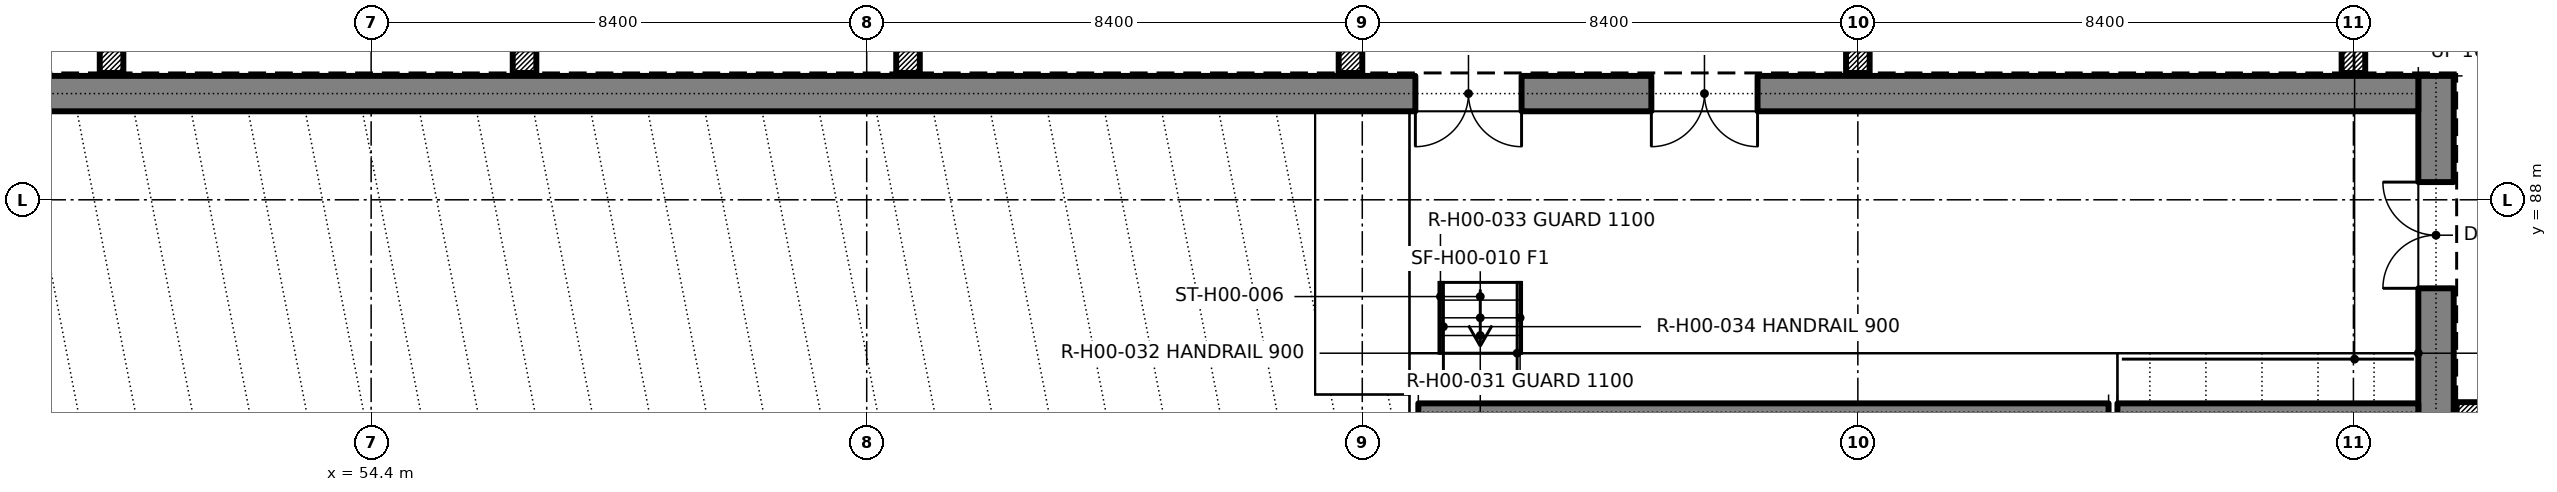
"""IFC4 building model, lengths in metres.
Left out: names, types, materials, properties, quantities, classifications, styles, units other than length and angle.
Written with IfcOpenShell. Run it as: python <this file> out.ifc"""

import sys

from ifc_helpers import new_model, si_unit, direction, frame, frame_2d, origin, origin_2d, place, context, subcontext, project, spatial, polyline, rectangle, outline, extrude, element, fill, save


model = new_model("IFC4")
c1 = context("Model", 3, precision=1e-05, world=origin(), true_north=direction((0.0, 1.0)))
c2 = subcontext(c1, "Body", "Model", "MODEL_VIEW")
j1 = project(units=[si_unit("LENGTHUNIT", "METRE"), si_unit("PLANEANGLEUNIT", "RADIAN")], contexts=[c1])
p1 = place(None, origin())
s1 = spatial("IfcSite", under=j1, at=p1, CompositionType="ELEMENT")
p2 = place(p1, origin())
s2 = spatial("IfcBuilding", under=s1, at=p2, CompositionType="ELEMENT")
p3 = place(p2, origin())
s3 = spatial("IfcBuildingStorey", under=s2, at=p3, CompositionType="ELEMENT", Elevation=0.0)
p4 = place(p3, frame((89.4, 60.7, 0.0), z_axis=(0.0, 0.0, 1.0), x_axis=(0.0, 1.0, 0.0)))
e1 = element("IfcWall", 1, at=p4, inside=s3, PredefinedType="SOLIDWALL", context=c2, shape_type="SweptSolid", body=[
    extrude(rectangle(XDim=29.4, YDim=0.6, at=frame_2d((14.7, 0.0))), origin(), (0.0, 0.0, 1.0), 5.4),
])
p5 = place(p4, frame((1.8, 0.0, 0.0)))
e2 = element("IfcOpeningElement", 2, at=p5, cuts=e1, PredefinedType="OPENING", context=c2, shape_type="SweptSolid", body=[
    extrude(rectangle(XDim=1.8, YDim=2.1, at=frame_2d((0.9, 1.05))), frame((0.0, 0.31, 0.0), z_axis=(0.0, -1.0, 0.0), x_axis=(1.0, 0.0, 0.0)), (0.0, 0.0, 1.0), 0.62),
])
p6 = place(p4, frame((25.8, 0.0, 0.0)))
e3 = element("IfcOpeningElement", 3, at=p6, cuts=e1, PredefinedType="OPENING", context=c2, shape_type="SweptSolid", body=[
    extrude(rectangle(XDim=1.8, YDim=2.1, at=frame_2d((0.9, 1.05))), frame((0.0, 0.31, 0.0), z_axis=(0.0, -1.0, 0.0), x_axis=(1.0, 0.0, 0.0)), (0.0, 0.0, 1.0), 0.62),
])
p7 = place(p3, frame((36.5, 89.8, 0.0), z_axis=(0.0, 0.0, 1.0), x_axis=(1.0, 0.0, 0.0)))
e4 = element("IfcWall", 4, at=p7, inside=s3, PredefinedType="SOLIDWALL", context=c2, shape_type="SweptSolid", body=[
    extrude(rectangle(XDim=52.6, YDim=0.6, at=frame_2d((26.3, 0.0))), origin(), (0.0, 0.0, 1.0), 5.4),
])
p8 = place(p7, frame((35.6, 0.0, 0.0)))
e5 = element("IfcOpeningElement", 5, at=p8, cuts=e4, PredefinedType="OPENING", context=c2, shape_type="SweptSolid", body=[
    extrude(rectangle(XDim=1.8, YDim=2.1, at=frame_2d((0.9, 1.05))), frame((0.0, 0.31, 0.0), z_axis=(0.0, -1.0, 0.0), x_axis=(1.0, 0.0, 0.0)), (0.0, 0.0, 1.0), 0.62),
])
p9 = place(p7, frame((39.6, 0.0, 0.0)))
e6 = element("IfcOpeningElement", 6, at=p9, cuts=e4, PredefinedType="OPENING", context=c2, shape_type="SweptSolid", body=[
    extrude(rectangle(XDim=1.8, YDim=2.1, at=frame_2d((0.9, 1.05))), frame((0.0, 0.31, 0.0), z_axis=(0.0, -1.0, 0.0), x_axis=(1.0, 0.0, 0.0)), (0.0, 0.0, 1.0), 0.62),
])
for number, where, z_axis, x_axis in (
    (7, (50.0, 90.35, 0.0), (0.0, 0.0, 1.0), (1.0, 0.0, 0.0)),
    (8, (57.0, 90.35, 0.0), (0.0, 0.0, 1.0), (1.0, 0.0, 0.0)),
    (9, (63.5, 90.35, 0.0), (0.0, 0.0, 1.0), (1.0, 0.0, 0.0)),
    (10, (71.0, 90.35, 0.0), (0.0, 0.0, 1.0), (1.0, 0.0, 0.0)),
    (11, (79.6, 90.35, 0.0), (0.0, 0.0, 1.0), (1.0, 0.0, 0.0)),
    (12, (88.0, 90.35, 0.0), (0.0, 0.0, 1.0), (1.0, 0.0, 0.0)),
    (13, (89.95, 84.37, 0.0), (0.0, 0.0, 1.0), (1.0, 0.0, 0.0)),
):
    element("IfcColumn", number, at=place(p3, frame(where, z_axis=z_axis, x_axis=x_axis)), inside=s3, PredefinedType="COLUMN", context=c2, shape_type="SweptSolid", body=[
        extrude(rectangle(XDim=0.4, YDim=0.4, at=origin_2d()), origin(), (0.0, 0.0, 1.0), 5.4),
    ])
p10 = place(p3, frame((72.15, 84.4, 0.0), z_axis=(0.0, 0.0, 1.0), x_axis=(1.0, 0.0, 0.0)))
e14 = element("IfcWall", 14, at=p10, inside=s3, PredefinedType="SOLIDWALL", context=c2, shape_type="SweptSolid", body=[
    extrude(rectangle(XDim=11.7, YDim=0.3, at=frame_2d((5.85, 0.0))), origin(), (0.0, 0.0, 1.0), 0.45),
])
p11 = place(p3, frame((84.0, 84.4, 0.0), z_axis=(0.0, 0.0, 1.0), x_axis=(1.0, 0.0, 0.0)))
e15 = element("IfcWall", 15, at=p11, inside=s3, PredefinedType="SOLIDWALL", context=c2, shape_type="SweptSolid", body=[
    extrude(outline(polyline([(0.0, 0.0), (5.1, 0.0), (5.1, 1.95), (0.0, 0.75), (0.0, 0.0)])), frame((0.0, 0.15, 0.0), z_axis=(0.0, -1.0, 0.0), x_axis=(1.0, 0.0, 0.0)), (0.0, 0.0, 1.0), 0.3),
])
p12 = place(p3, frame((89.4, 88.83, -0.3), z_axis=(0.0, 0.0, 1.0), x_axis=(0.0, 1.0, 0.0)))
e16 = element("IfcWall", 16, at=p12, inside=s3, PredefinedType="SOLIDWALL", context=c2, shape_type="SweptSolid", body=[
    extrude(rectangle(XDim=1.27, YDim=0.6, at=frame_2d((0.635, 0.0))), origin(), (0.0, 0.0, 1.0), 0.3),
])
p13 = place(p3, frame((89.4, 82.95, -0.3), z_axis=(0.0, 0.0, 1.0), x_axis=(0.0, 1.0, 0.0)))
e17 = element("IfcWall", 17, at=p13, inside=s3, PredefinedType="SOLIDWALL", context=c2, shape_type="SweptSolid", body=[
    extrude(rectangle(XDim=2.84, YDim=0.6, at=frame_2d((1.42, 0.0))), origin(), (0.0, 0.0, 1.0), 0.3),
])
for number, where, z_axis, x_axis in (
    (18, (89.4, 85.79, -0.3), (0.0, 0.0, 1.0), (0.0, 1.0, 0.0)),
    (19, (48.48, 89.8, -0.3), (0.0, 0.0, 1.0), (1.0, 0.0, 0.0)),
    (20, (55.48, 89.8, -0.3), (0.0, 0.0, 1.0), (1.0, 0.0, 0.0)),
    (21, (61.98, 89.8, -0.3), (0.0, 0.0, 1.0), (1.0, 0.0, 0.0)),
    (22, (69.48, 89.8, -0.3), (0.0, 0.0, 1.0), (1.0, 0.0, 0.0)),
    (23, (78.08, 89.8, -0.3), (0.0, 0.0, 1.0), (1.0, 0.0, 0.0)),
):
    element("IfcWall", number, at=place(p3, frame(where, z_axis=z_axis, x_axis=x_axis)), inside=s3, PredefinedType="SOLIDWALL", context=c2, shape_type="SweptSolid", body=[
        extrude(rectangle(XDim=3.04, YDim=0.6, at=frame_2d((1.52, 0.0))), origin(), (0.0, 0.0, 1.0), 0.3),
    ])
p14 = place(p3, frame((86.48, 89.8, -0.3), z_axis=(0.0, 0.0, 1.0), x_axis=(1.0, 0.0, 0.0)))
e24 = element("IfcWall", 24, at=p14, inside=s3, PredefinedType="SOLIDWALL", context=c2, shape_type="SweptSolid", body=[
    extrude(rectangle(XDim=2.62, YDim=0.6, at=frame_2d((1.31, 0.0))), origin(), (0.0, 0.0, 1.0), 0.3),
])
p15 = place(p3, frame((51.52, 89.8, -0.3), z_axis=(0.0, 0.0, 1.0), x_axis=(1.0, 0.0, 0.0)))
e25 = element("IfcWall", 25, at=p15, inside=s3, PredefinedType="SOLIDWALL", context=c2, shape_type="SweptSolid", body=[
    extrude(rectangle(XDim=3.96, YDim=0.6, at=frame_2d((1.98, 0.0))), origin(), (0.0, 0.0, 1.0), 0.3),
])
p16 = place(p3, frame((58.52, 89.8, -0.3), z_axis=(0.0, 0.0, 1.0), x_axis=(1.0, 0.0, 0.0)))
e26 = element("IfcWall", 26, at=p16, inside=s3, PredefinedType="SOLIDWALL", context=c2, shape_type="SweptSolid", body=[
    extrude(rectangle(XDim=3.46, YDim=0.6, at=frame_2d((1.73, 0.0))), origin(), (0.0, 0.0, 1.0), 0.3),
])
p17 = place(p3, frame((65.02, 89.8, -0.3), z_axis=(0.0, 0.0, 1.0), x_axis=(1.0, 0.0, 0.0)))
e27 = element("IfcWall", 27, at=p17, inside=s3, PredefinedType="SOLIDWALL", context=c2, shape_type="SweptSolid", body=[
    extrude(rectangle(XDim=4.46, YDim=0.6, at=frame_2d((2.23, 0.0))), origin(), (0.0, 0.0, 1.0), 0.3),
])
p18 = place(p3, frame((72.52, 89.8, -0.3), z_axis=(0.0, 0.0, 1.0), x_axis=(1.0, 0.0, 0.0)))
e28 = element("IfcWall", 28, at=p18, inside=s3, PredefinedType="SOLIDWALL", context=c2, shape_type="SweptSolid", body=[
    extrude(rectangle(XDim=5.56, YDim=0.6, at=frame_2d((2.78, 0.0))), origin(), (0.0, 0.0, 1.0), 0.3),
])
p19 = place(p3, frame((81.12, 89.8, -0.3), z_axis=(0.0, 0.0, 1.0), x_axis=(1.0, 0.0, 0.0)))
e29 = element("IfcWall", 29, at=p19, inside=s3, PredefinedType="SOLIDWALL", context=c2, shape_type="SweptSolid", body=[
    extrude(rectangle(XDim=5.36, YDim=0.6, at=frame_2d((2.68, 0.0))), origin(), (0.0, 0.0, 1.0), 0.3),
])
p20 = place(p3, frame((72.15, 84.4, -0.805), z_axis=(0.0, 0.0, 1.0), x_axis=(1.0, 0.0, 0.0)))
e30 = element("IfcWall", 30, at=p20, inside=s3, PredefinedType="SOLIDWALL", context=c2, shape_type="SweptSolid", body=[
    extrude(rectangle(XDim=0.47, YDim=0.3, at=frame_2d((0.235, 0.0))), origin(), (0.0, 0.0, 1.0), 0.805),
])
p21 = place(p3, frame((72.62, 84.4, -0.3), z_axis=(0.0, 0.0, 1.0), x_axis=(1.0, 0.0, 0.0)))
e31 = element("IfcWall", 31, at=p21, inside=s3, PredefinedType="SOLIDWALL", context=c2, shape_type="SweptSolid", body=[
    extrude(rectangle(XDim=11.4, YDim=0.3, at=frame_2d((5.7, 0.0))), origin(), (0.0, 0.0, 1.0), 0.3),
])
p22 = place(p3, frame((88.43, 84.4, -0.3), z_axis=(0.0, 0.0, 1.0), x_axis=(1.0, 0.0, 0.0)))
e32 = element("IfcWall", 32, at=p22, inside=s3, PredefinedType="SOLIDWALL", context=c2, shape_type="SweptSolid", body=[
    extrude(rectangle(XDim=0.67, YDim=0.3, at=frame_2d((0.335, 0.0))), origin(), (0.0, 0.0, 1.0), 0.3),
])
p23 = place(p3, frame((84.02, 84.4, -0.3), z_axis=(0.0, 0.0, 1.0), x_axis=(1.0, 0.0, 0.0)))
e33 = element("IfcWall", 33, at=p23, inside=s3, PredefinedType="SOLIDWALL", context=c2, shape_type="SweptSolid", body=[
    extrude(rectangle(XDim=4.41, YDim=0.3, at=frame_2d((2.205, 0.0))), origin(), (0.0, 0.0, 1.0), 0.3),
])
p24 = place(p3, frame((55.1, 84.757, -0.3), z_axis=(0.0, 0.0, 1.0), x_axis=(1.0, 0.0, 0.0)))
e34 = element("IfcColumn", 34, at=p24, inside=s3, PredefinedType="COLUMN", context=c2, shape_type="SweptSolid", body=[
    extrude(rectangle(XDim=0.7, YDim=0.7, at=origin_2d()), origin(), (0.0, 0.0, 1.0), 0.729),
])
p25 = place(p3, frame((55.9, 84.757, -0.3), z_axis=(0.0, 0.0, 1.0), x_axis=(1.0, 0.0, 0.0)))
e35 = element("IfcColumn", 35, at=p25, inside=s3, PredefinedType="COLUMN", context=c2, shape_type="SweptSolid", body=[
    extrude(rectangle(XDim=0.7, YDim=0.7, at=origin_2d()), origin(), (0.0, 0.0, 1.0), 1.171),
])
p26 = place(p3, frame((63.35, 84.757, -0.805), z_axis=(0.0, 0.0, 1.0), x_axis=(1.0, 0.0, 0.0)))
e36 = element("IfcColumn", 36, at=p26, inside=s3, PredefinedType="COLUMN", context=c2, shape_type="SweptSolid", body=[
    extrude(rectangle(XDim=0.7, YDim=0.7, at=origin_2d()), origin(), (0.0, 0.0, 1.0), 0.634),
])
p27 = place(p3, frame((64.15, 84.757, -0.805), z_axis=(0.0, 0.0, 1.0), x_axis=(1.0, 0.0, 0.0)))
e37 = element("IfcColumn", 37, at=p27, inside=s3, PredefinedType="COLUMN", context=c2, shape_type="SweptSolid", body=[
    extrude(rectangle(XDim=0.7, YDim=0.7, at=origin_2d()), origin(), (0.0, 0.0, 1.0), 1.076),
])
p28 = place(p3, frame((55.1, 88.5, -0.3), z_axis=(0.0, 0.0, 1.0), x_axis=(1.0, 0.0, 0.0)))
e38 = element("IfcColumn", 38, at=p28, inside=s3, PredefinedType="COLUMN", context=c2, shape_type="SweptSolid", body=[
    extrude(rectangle(XDim=0.7, YDim=0.7, at=origin_2d()), origin(), (0.0, 0.0, 1.0), 0.729),
])
p29 = place(p3, frame((55.9, 88.5, -0.3), z_axis=(0.0, 0.0, 1.0), x_axis=(1.0, 0.0, 0.0)))
e39 = element("IfcColumn", 39, at=p29, inside=s3, PredefinedType="COLUMN", context=c2, shape_type="SweptSolid", body=[
    extrude(rectangle(XDim=0.7, YDim=0.7, at=origin_2d()), origin(), (0.0, 0.0, 1.0), 1.171),
])
p30 = place(p3, frame((63.35, 88.5, -0.805), z_axis=(0.0, 0.0, 1.0), x_axis=(1.0, 0.0, 0.0)))
e40 = element("IfcColumn", 40, at=p30, inside=s3, PredefinedType="COLUMN", context=c2, shape_type="SweptSolid", body=[
    extrude(rectangle(XDim=0.7, YDim=0.7, at=origin_2d()), origin(), (0.0, 0.0, 1.0), 0.634),
])
p31 = place(p3, frame((64.15, 88.5, -0.805), z_axis=(0.0, 0.0, 1.0), x_axis=(1.0, 0.0, 0.0)))
e41 = element("IfcColumn", 41, at=p31, inside=s3, PredefinedType="COLUMN", context=c2, shape_type="SweptSolid", body=[
    extrude(rectangle(XDim=0.7, YDim=0.7, at=origin_2d()), origin(), (0.0, 0.0, 1.0), 1.076),
])
p32 = place(p8, frame((1.8, 0.0, 0.0), z_axis=(0.0, 0.0, 1.0), x_axis=(-1.0, 0.0, 0.0)))
e42 = element("IfcDoor", 42, at=p32, inside=s3, OperationType="DOUBLE_DOOR_SINGLE_SWING", PredefinedType="DOOR", context=c2, shape_type="SweptSolid", body=[
    extrude(rectangle(XDim=1.8, YDim=2.1, at=frame_2d((0.9, 1.05))), frame((0.0, 0.025, 0.0), z_axis=(0.0, -1.0, 0.0), x_axis=(1.0, 0.0, 0.0)), (0.0, 0.0, 1.0), 0.05),
])
fill(e5, e42)
p33 = place(p9, frame((1.8, 0.0, 0.0), z_axis=(0.0, 0.0, 1.0), x_axis=(-1.0, 0.0, 0.0)))
e43 = element("IfcDoor", 43, at=p33, inside=s3, OperationType="DOUBLE_DOOR_SINGLE_SWING", PredefinedType="DOOR", context=c2, shape_type="SweptSolid", body=[
    extrude(rectangle(XDim=1.8, YDim=2.1, at=frame_2d((0.9, 1.05))), frame((0.0, 0.025, 0.0), z_axis=(0.0, -1.0, 0.0), x_axis=(1.0, 0.0, 0.0)), (0.0, 0.0, 1.0), 0.05),
])
fill(e6, e43)
p34 = place(p6, origin())
e44 = element("IfcDoor", 44, at=p34, inside=s3, OperationType="DOUBLE_DOOR_SINGLE_SWING", PredefinedType="DOOR", context=c2, shape_type="SweptSolid", body=[
    extrude(rectangle(XDim=1.8, YDim=2.1, at=frame_2d((0.9, 1.05))), frame((0.0, 0.025, 0.0), z_axis=(0.0, -1.0, 0.0), x_axis=(1.0, 0.0, 0.0)), (0.0, 0.0, 1.0), 0.05),
])
fill(e3, e44)
save(model, sys.argv[1])
